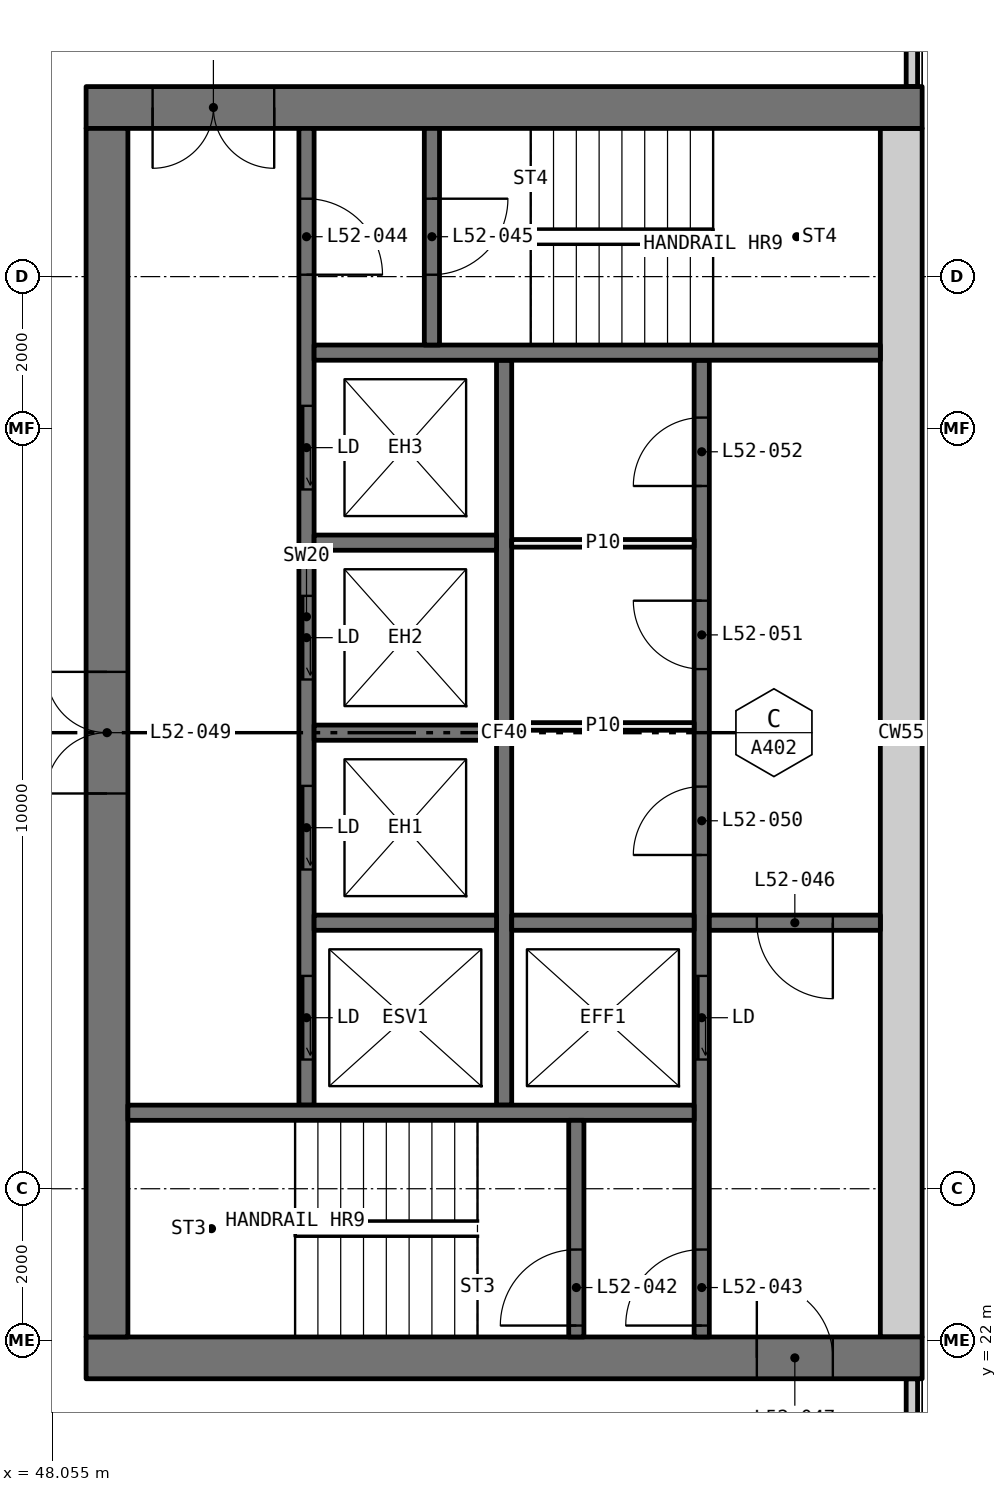
"""IFC4 building model, lengths in metres.
Left out: names, types, materials, properties, quantities, classifications, styles, units other than length and angle.
Written with IfcOpenShell. Run it as: python <this file> out.ifc"""

import sys

from ifc_helpers import new_model, si_unit, direction, frame, frame_2d, origin, place, context, subcontext, project, spatial, rectangle, extrude, element, fill, save


model = new_model("IFC4")
c1 = context("Model", 3, precision=1e-05, world=origin(), true_north=direction((0.0, 1.0)))
c2 = subcontext(c1, "Body", "Model", "MODEL_VIEW")
j1 = project(units=[si_unit("LENGTHUNIT", "METRE"), si_unit("PLANEANGLEUNIT", "RADIAN")], contexts=[c1])
p1 = place(None, origin())
s1 = spatial("IfcSite", under=j1, at=p1, CompositionType="ELEMENT")
p2 = place(p1, origin())
s2 = spatial("IfcBuilding", under=s1, at=p2, CompositionType="ELEMENT")
p3 = place(p2, frame((0.0, 0.0, 196.2)))
s3 = spatial("IfcBuildingStorey", under=s2, at=p3, CompositionType="ELEMENT", Elevation=196.2)
for number, where, z_axis, x_axis in (
    (1, (59.365, 18.71, 0.0), (0.0, 0.0, 1.0), (0.0, 1.0, 0.0)),
    (2, (59.365, 38.5, 0.0), (0.0, 0.0, 1.0), (0.0, 1.0, 0.0)),
):
    element("IfcWall", number, at=place(p3, frame(where, z_axis=z_axis, x_axis=x_axis)), inside=s3, PredefinedType="ELEMENTEDWALL", context=c2, shape_type="SweptSolid", body=[
        extrude(rectangle(XDim=2.79, YDim=0.15, at=frame_2d((1.395, 0.0))), origin(), (0.0, 0.0, 1.0), 3.05),
    ])
p4 = place(p3, frame((59.5, 21.775, 0.0), z_axis=(0.0, 0.0, 1.0), x_axis=(-1.0, 0.0, 0.0)))
e3 = element("IfcWall", 3, at=p4, inside=s3, PredefinedType="SHEAR", context=c2, shape_type="SweptSolid", body=[
    extrude(rectangle(XDim=11.0, YDim=0.55, at=frame_2d((5.5, 0.0))), origin(), (0.0, 0.0, 1.0), 3.05),
])
p5 = place(p4, frame((1.175, 0.0, 0.0)))
e4 = element("IfcOpeningElement", 4, at=p5, cuts=e3, PredefinedType="OPENING", context=c2, shape_type="SweptSolid", body=[
    extrude(rectangle(XDim=1.0, YDim=2.1, at=frame_2d((0.5, 1.05))), frame((0.0, 0.285, 0.0), z_axis=(0.0, -1.0, 0.0), x_axis=(1.0, 0.0, 0.0)), (0.0, 0.0, 1.0), 0.57),
])
p6 = place(p3, frame((59.5, 38.225, 0.0), z_axis=(0.0, 0.0, 1.0), x_axis=(-1.0, 0.0, 0.0)))
e5 = element("IfcWall", 5, at=p6, inside=s3, PredefinedType="SHEAR", context=c2, shape_type="SweptSolid", body=[
    extrude(rectangle(XDim=11.0, YDim=0.55, at=frame_2d((5.5, 0.0))), origin(), (0.0, 0.0, 1.0), 3.05),
])
p7 = place(p6, frame((8.525, 0.0, 0.0)))
e6 = element("IfcOpeningElement", 6, at=p7, cuts=e5, PredefinedType="OPENING", context=c2, shape_type="SweptSolid", body=[
    extrude(rectangle(XDim=1.6, YDim=2.1, at=frame_2d((0.8, 1.05))), frame((0.0, 0.285, 0.0), z_axis=(0.0, -1.0, 0.0), x_axis=(1.0, 0.0, 0.0)), (0.0, 0.0, 1.0), 0.57),
])
p8 = place(p3, frame((59.225, 22.05, 0.0), z_axis=(0.0, 0.0, 1.0), x_axis=(0.0, 1.0, 0.0)))
e7 = element("IfcWall", 7, at=p8, inside=s3, PredefinedType="SHEAR", context=c2, shape_type="SweptSolid", body=[
    extrude(rectangle(XDim=15.9, YDim=0.55, at=frame_2d((7.95, 0.0))), origin(), (0.0, 0.0, 1.0), 3.05),
])
p9 = place(p3, frame((48.775, 22.05, 0.0), z_axis=(0.0, 0.0, 1.0), x_axis=(0.0, 1.0, 0.0)))
e8 = element("IfcWall", 8, at=p9, inside=s3, PredefinedType="SHEAR", context=c2, shape_type="SweptSolid", body=[
    extrude(rectangle(XDim=15.9, YDim=0.55, at=frame_2d((7.95, 0.0))), origin(), (0.0, 0.0, 1.0), 3.05),
])
p10 = place(p9, frame((7.15, 0.0, 0.0)))
e9 = element("IfcOpeningElement", 9, at=p10, cuts=e8, PredefinedType="OPENING", context=c2, shape_type="SweptSolid", body=[
    extrude(rectangle(XDim=1.6, YDim=2.1, at=frame_2d((0.8, 1.05))), frame((0.0, 0.285, 0.0), z_axis=(0.0, -1.0, 0.0), x_axis=(1.0, 0.0, 0.0)), (0.0, 0.0, 1.0), 0.57),
])
p11 = place(p3, frame((56.6, 22.05, 0.0), z_axis=(0.0, 0.0, 1.0), x_axis=(0.0, 1.0, 0.0)))
e10 = element("IfcWall", 10, at=p11, inside=s3, PredefinedType="SOLIDWALL", context=c2, shape_type="SweptSolid", body=[
    extrude(rectangle(XDim=12.85, YDim=0.2, at=frame_2d((6.425, 0.0))), origin(), (0.0, 0.0, 1.0), 3.05),
])
p12 = place(p11, frame((3.65, 0.0, 0.0)))
e11 = element("IfcOpeningElement", 11, at=p12, cuts=e10, PredefinedType="OPENING", context=c2, shape_type="SweptSolid", body=[
    extrude(rectangle(XDim=1.1, YDim=2.1, at=frame_2d((0.55, 1.05))), frame((0.0, 0.11, 0.0), z_axis=(0.0, -1.0, 0.0), x_axis=(1.0, 0.0, 0.0)), (0.0, 0.0, 1.0), 0.22),
])
p13 = place(p11, frame((0.15, 0.0, 0.0)))
e12 = element("IfcOpeningElement", 12, at=p13, cuts=e10, PredefinedType="OPENING", context=c2, shape_type="SweptSolid", body=[
    extrude(rectangle(XDim=1.0, YDim=2.1, at=frame_2d((0.5, 1.05))), frame((0.0, 0.11, 0.0), z_axis=(0.0, -1.0, 0.0), x_axis=(1.0, 0.0, 0.0)), (0.0, 0.0, 1.0), 0.22),
])
p14 = place(p11, frame((6.341, 0.0, 0.0)))
e13 = element("IfcOpeningElement", 13, at=p14, cuts=e10, PredefinedType="OPENING", context=c2, shape_type="SweptSolid", body=[
    extrude(rectangle(XDim=0.9, YDim=2.1, at=frame_2d((0.45, 1.05))), frame((0.0, 0.11, 0.0), z_axis=(0.0, -1.0, 0.0), x_axis=(1.0, 0.0, 0.0)), (0.0, 0.0, 1.0), 0.22),
])
p15 = place(p11, frame((8.787, 0.0, 0.0)))
e14 = element("IfcOpeningElement", 14, at=p15, cuts=e10, PredefinedType="OPENING", context=c2, shape_type="SweptSolid", body=[
    extrude(rectangle(XDim=0.9, YDim=2.1, at=frame_2d((0.45, 1.05))), frame((0.0, 0.11, 0.0), z_axis=(0.0, -1.0, 0.0), x_axis=(1.0, 0.0, 0.0)), (0.0, 0.0, 1.0), 0.22),
])
p16 = place(p11, frame((11.196, 0.0, 0.0)))
e15 = element("IfcOpeningElement", 15, at=p16, cuts=e10, PredefinedType="OPENING", context=c2, shape_type="SweptSolid", body=[
    extrude(rectangle(XDim=0.9, YDim=2.1, at=frame_2d((0.45, 1.05))), frame((0.0, 0.11, 0.0), z_axis=(0.0, -1.0, 0.0), x_axis=(1.0, 0.0, 0.0)), (0.0, 0.0, 1.0), 0.22),
])
p17 = place(p3, frame((51.4, 25.1, 0.0), z_axis=(0.0, 0.0, 1.0), x_axis=(0.0, 1.0, 0.0)))
e16 = element("IfcWall", 16, at=p17, inside=s3, PredefinedType="SOLIDWALL", context=c2, shape_type="SweptSolid", body=[
    extrude(rectangle(XDim=12.85, YDim=0.2, at=frame_2d((6.425, 0.0))), origin(), (0.0, 0.0, 1.0), 3.05),
])
p18 = place(p17, frame((0.6, 0.0, 0.0)))
e17 = element("IfcOpeningElement", 17, at=p18, cuts=e16, PredefinedType="OPENING", context=c2, shape_type="SweptSolid", body=[
    extrude(rectangle(XDim=1.1, YDim=2.1, at=frame_2d((0.55, 1.05))), frame((0.0, 0.11, 0.0), z_axis=(0.0, -1.0, 0.0), x_axis=(1.0, 0.0, 0.0)), (0.0, 0.0, 1.0), 0.22),
])
p19 = place(p17, frame((3.1, 0.0, 0.0)))
e18 = element("IfcOpeningElement", 18, at=p19, cuts=e16, PredefinedType="OPENING", context=c2, shape_type="SweptSolid", body=[
    extrude(rectangle(XDim=1.1, YDim=2.1, at=frame_2d((0.55, 1.05))), frame((0.0, 0.11, 0.0), z_axis=(0.0, -1.0, 0.0), x_axis=(1.0, 0.0, 0.0)), (0.0, 0.0, 1.0), 0.22),
])
p20 = place(p17, frame((5.6, 0.0, 0.0)))
e19 = element("IfcOpeningElement", 19, at=p20, cuts=e16, PredefinedType="OPENING", context=c2, shape_type="SweptSolid", body=[
    extrude(rectangle(XDim=1.1, YDim=2.1, at=frame_2d((0.55, 1.05))), frame((0.0, 0.11, 0.0), z_axis=(0.0, -1.0, 0.0), x_axis=(1.0, 0.0, 0.0)), (0.0, 0.0, 1.0), 0.22),
])
p21 = place(p17, frame((8.1, 0.0, 0.0)))
e20 = element("IfcOpeningElement", 20, at=p21, cuts=e16, PredefinedType="OPENING", context=c2, shape_type="SweptSolid", body=[
    extrude(rectangle(XDim=1.1, YDim=2.1, at=frame_2d((0.55, 1.05))), frame((0.0, 0.11, 0.0), z_axis=(0.0, -1.0, 0.0), x_axis=(1.0, 0.0, 0.0)), (0.0, 0.0, 1.0), 0.22),
])
p22 = place(p17, frame((10.925, 0.0, 0.0)))
e21 = element("IfcOpeningElement", 21, at=p22, cuts=e16, PredefinedType="OPENING", context=c2, shape_type="SweptSolid", body=[
    extrude(rectangle(XDim=1.0, YDim=2.1, at=frame_2d((0.5, 1.05))), frame((0.0, 0.11, 0.0), z_axis=(0.0, -1.0, 0.0), x_axis=(1.0, 0.0, 0.0)), (0.0, 0.0, 1.0), 0.22),
])
p23 = place(p3, frame((54.0, 25.1, 0.0), z_axis=(0.0, 0.0, 1.0), x_axis=(0.0, 1.0, 0.0)))
e22 = element("IfcWall", 22, at=p23, inside=s3, PredefinedType="SOLIDWALL", context=c2, shape_type="SweptSolid", body=[
    extrude(rectangle(XDim=9.8, YDim=0.2, at=frame_2d((4.9, 0.0))), origin(), (0.0, 0.0, 1.0), 3.05),
])
for number, where, z_axis, x_axis in (
    (23, (56.5, 25.0, 0.0), (0.0, 0.0, 1.0), (-1.0, 0.0, 0.0)),
    (24, (58.95, 35.0, 0.0), (0.0, 0.0, 1.0), (-1.0, 0.0, 0.0)),
):
    element("IfcWall", number, at=place(p3, frame(where, z_axis=z_axis, x_axis=x_axis)), inside=s3, PredefinedType="SOLIDWALL", context=c2, shape_type="SweptSolid", body=[
        extrude(rectangle(XDim=7.45, YDim=0.2, at=frame_2d((3.725, 0.0))), origin(), (0.0, 0.0, 1.0), 3.05),
    ])
p24 = place(p3, frame((58.95, 27.5, 0.0), z_axis=(0.0, 0.0, 1.0), x_axis=(-1.0, 0.0, 0.0)))
e25 = element("IfcWall", 25, at=p24, inside=s3, PredefinedType="SOLIDWALL", context=c2, shape_type="SweptSolid", body=[
    extrude(rectangle(XDim=2.25, YDim=0.2, at=frame_2d((1.125, 0.0))), origin(), (0.0, 0.0, 1.0), 3.05),
])
p25 = place(p24, frame((0.625, 0.0, 0.0)))
e26 = element("IfcOpeningElement", 26, at=p25, cuts=e25, PredefinedType="OPENING", context=c2, shape_type="SweptSolid", body=[
    extrude(rectangle(XDim=1.0, YDim=2.1, at=frame_2d((0.5, 1.05))), frame((0.0, 0.11, 0.0), z_axis=(0.0, -1.0, 0.0), x_axis=(1.0, 0.0, 0.0)), (0.0, 0.0, 1.0), 0.22),
])
p26 = place(p3, frame((54.95, 22.05, 0.0), z_axis=(0.0, 0.0, 1.0), x_axis=(0.0, 1.0, 0.0)))
e27 = element("IfcWall", 27, at=p26, inside=s3, PredefinedType="SOLIDWALL", context=c2, shape_type="SweptSolid", body=[
    extrude(rectangle(XDim=2.85, YDim=0.2, at=frame_2d((1.425, 0.0))), origin(), (0.0, 0.0, 1.0), 3.05),
])
p27 = place(p26, frame((0.15, 0.0, 0.0)))
e28 = element("IfcOpeningElement", 28, at=p27, cuts=e27, PredefinedType="OPENING", context=c2, shape_type="SweptSolid", body=[
    extrude(rectangle(XDim=1.0, YDim=2.1, at=frame_2d((0.5, 1.05))), frame((0.0, 0.11, 0.0), z_axis=(0.0, -1.0, 0.0), x_axis=(1.0, 0.0, 0.0)), (0.0, 0.0, 1.0), 0.22),
])
p28 = place(p3, frame((53.05, 35.1, 0.0), z_axis=(0.0, 0.0, 1.0), x_axis=(0.0, 1.0, 0.0)))
e29 = element("IfcWall", 29, at=p28, inside=s3, PredefinedType="SOLIDWALL", context=c2, shape_type="SweptSolid", body=[
    extrude(rectangle(XDim=2.85, YDim=0.2, at=frame_2d((1.425, 0.0))), origin(), (0.0, 0.0, 1.0), 3.05),
])
p29 = place(p28, frame((0.925, 0.0, 0.0)))
e30 = element("IfcOpeningElement", 30, at=p29, cuts=e29, PredefinedType="OPENING", context=c2, shape_type="SweptSolid", body=[
    extrude(rectangle(XDim=1.0, YDim=2.1, at=frame_2d((0.5, 1.05))), frame((0.0, 0.11, 0.0), z_axis=(0.0, -1.0, 0.0), x_axis=(1.0, 0.0, 0.0)), (0.0, 0.0, 1.0), 0.22),
])
for number, where, z_axis, x_axis in (
    (31, (56.5, 27.5, 0.0), (0.0, 0.0, 1.0), (-1.0, 0.0, 0.0)),
    (32, (53.9, 27.5, 0.0), (0.0, 0.0, 1.0), (-1.0, 0.0, 0.0)),
    (33, (53.9, 30.0, 0.0), (0.0, 0.0, 1.0), (-1.0, 0.0, 0.0)),
    (34, (53.9, 32.5, 0.0), (0.0, 0.0, 1.0), (-1.0, 0.0, 0.0)),
):
    element("IfcWall", number, at=place(p3, frame(where, z_axis=z_axis, x_axis=x_axis)), inside=s3, PredefinedType="SOLIDWALL", context=c2, shape_type="SweptSolid", body=[
        extrude(rectangle(XDim=2.4, YDim=0.2, at=frame_2d((1.2, 0.0))), origin(), (0.0, 0.0, 1.0), 3.05),
    ])
for number, where, z_axis, x_axis in (
    (35, (56.5, 30.082, 0.0), (0.0, 0.0, 1.0), (-1.0, 0.0, 0.0)),
    (36, (56.5, 32.491, 0.0), (0.0, 0.0, 1.0), (-1.0, 0.0, 0.0)),
):
    element("IfcWall", number, at=place(p3, frame(where, z_axis=z_axis, x_axis=x_axis)), inside=s3, PredefinedType="PARTITIONING", context=c2, shape_type="SweptSolid", body=[
        extrude(rectangle(XDim=2.4, YDim=0.1, at=frame_2d((1.2, 0.0))), origin(), (0.0, 0.0, 1.0), 3.05),
    ])
p30 = place(p18, origin())
e37 = element("IfcDoor", 37, at=p30, inside=s3, OperationType="SLIDING_TO_LEFT", PredefinedType="DOOR", context=c2, shape_type="SweptSolid", body=[
    extrude(rectangle(XDim=1.1, YDim=2.1, at=frame_2d((0.55, 1.05))), frame((0.0, 0.025, 0.0), z_axis=(0.0, -1.0, 0.0), x_axis=(1.0, 0.0, 0.0)), (0.0, 0.0, 1.0), 0.05),
])
fill(e17, e37)
p31 = place(p19, origin())
e38 = element("IfcDoor", 38, at=p31, inside=s3, OperationType="SLIDING_TO_LEFT", PredefinedType="DOOR", context=c2, shape_type="SweptSolid", body=[
    extrude(rectangle(XDim=1.1, YDim=2.1, at=frame_2d((0.55, 1.05))), frame((0.0, 0.025, 0.0), z_axis=(0.0, -1.0, 0.0), x_axis=(1.0, 0.0, 0.0)), (0.0, 0.0, 1.0), 0.05),
])
fill(e18, e38)
p32 = place(p20, origin())
e39 = element("IfcDoor", 39, at=p32, inside=s3, OperationType="SLIDING_TO_LEFT", PredefinedType="DOOR", context=c2, shape_type="SweptSolid", body=[
    extrude(rectangle(XDim=1.1, YDim=2.1, at=frame_2d((0.55, 1.05))), frame((0.0, 0.025, 0.0), z_axis=(0.0, -1.0, 0.0), x_axis=(1.0, 0.0, 0.0)), (0.0, 0.0, 1.0), 0.05),
])
fill(e19, e39)
p33 = place(p21, origin())
e40 = element("IfcDoor", 40, at=p33, inside=s3, OperationType="SLIDING_TO_LEFT", PredefinedType="DOOR", context=c2, shape_type="SweptSolid", body=[
    extrude(rectangle(XDim=1.1, YDim=2.1, at=frame_2d((0.55, 1.05))), frame((0.0, 0.025, 0.0), z_axis=(0.0, -1.0, 0.0), x_axis=(1.0, 0.0, 0.0)), (0.0, 0.0, 1.0), 0.05),
])
fill(e20, e40)
p34 = place(p12, origin())
e41 = element("IfcDoor", 41, at=p34, inside=s3, OperationType="SLIDING_TO_LEFT", PredefinedType="DOOR", context=c2, shape_type="SweptSolid", body=[
    extrude(rectangle(XDim=1.1, YDim=2.1, at=frame_2d((0.55, 1.05))), frame((0.0, 0.025, 0.0), z_axis=(0.0, -1.0, 0.0), x_axis=(1.0, 0.0, 0.0)), (0.0, 0.0, 1.0), 0.05),
])
fill(e11, e41)
p35 = place(p27, origin())
e42 = element("IfcDoor", 42, at=p35, inside=s3, OperationType="SINGLE_SWING_RIGHT", PredefinedType="DOOR", context=c2, shape_type="SweptSolid", body=[
    extrude(rectangle(XDim=1.0, YDim=2.1, at=frame_2d((0.5, 1.05))), frame((0.0, 0.025, 0.0), z_axis=(0.0, -1.0, 0.0), x_axis=(1.0, 0.0, 0.0)), (0.0, 0.0, 1.0), 0.05),
])
fill(e28, e42)
p36 = place(p13, origin())
e43 = element("IfcDoor", 43, at=p36, inside=s3, OperationType="SINGLE_SWING_RIGHT", PredefinedType="DOOR", context=c2, shape_type="SweptSolid", body=[
    extrude(rectangle(XDim=1.0, YDim=2.1, at=frame_2d((0.5, 1.05))), frame((0.0, 0.025, 0.0), z_axis=(0.0, -1.0, 0.0), x_axis=(1.0, 0.0, 0.0)), (0.0, 0.0, 1.0), 0.05),
])
fill(e12, e43)
p37 = place(p22, frame((1.0, 0.0, 0.0), x_axis=(-1.0, 0.0, 0.0)))
e44 = element("IfcDoor", 44, at=p37, inside=s3, OperationType="SINGLE_SWING_LEFT", PredefinedType="DOOR", context=c2, shape_type="SweptSolid", body=[
    extrude(rectangle(XDim=1.0, YDim=2.1, at=frame_2d((0.5, 1.05))), frame((0.0, 0.025, 0.0), z_axis=(0.0, -1.0, 0.0), x_axis=(1.0, 0.0, 0.0)), (0.0, 0.0, 1.0), 0.05),
])
fill(e21, e44)
p38 = place(p29, frame((1.0, 0.0, 0.0), x_axis=(-1.0, 0.0, 0.0)))
e45 = element("IfcDoor", 45, at=p38, inside=s3, OperationType="SINGLE_SWING_RIGHT", PredefinedType="DOOR", context=c2, shape_type="SweptSolid", body=[
    extrude(rectangle(XDim=1.0, YDim=2.1, at=frame_2d((0.5, 1.05))), frame((0.0, 0.025, 0.0), z_axis=(0.0, -1.0, 0.0), x_axis=(1.0, 0.0, 0.0)), (0.0, 0.0, 1.0), 0.05),
])
fill(e30, e45)
p39 = place(p25, origin())
e46 = element("IfcDoor", 46, at=p39, inside=s3, OperationType="SINGLE_SWING_RIGHT", PredefinedType="DOOR", context=c2, shape_type="SweptSolid", body=[
    extrude(rectangle(XDim=1.0, YDim=2.1, at=frame_2d((0.5, 1.05))), frame((0.0, 0.025, 0.0), z_axis=(0.0, -1.0, 0.0), x_axis=(1.0, 0.0, 0.0)), (0.0, 0.0, 1.0), 0.05),
])
fill(e26, e46)
p40 = place(p5, frame((1.0, 0.0, 0.0), x_axis=(-1.0, 0.0, 0.0)))
e47 = element("IfcDoor", 47, at=p40, inside=s3, OperationType="SINGLE_SWING_RIGHT", PredefinedType="DOOR", context=c2, shape_type="SweptSolid", body=[
    extrude(rectangle(XDim=1.0, YDim=2.1, at=frame_2d((0.5, 1.05))), frame((0.0, 0.025, 0.0), z_axis=(0.0, -1.0, 0.0), x_axis=(1.0, 0.0, 0.0)), (0.0, 0.0, 1.0), 0.05),
])
fill(e4, e47)
p41 = place(p7, origin())
e48 = element("IfcDoor", 48, at=p41, inside=s3, OperationType="DOUBLE_DOOR_SINGLE_SWING", PredefinedType="DOOR", context=c2, shape_type="SweptSolid", body=[
    extrude(rectangle(XDim=1.6, YDim=2.1, at=frame_2d((0.8, 1.05))), frame((0.0, 0.025, 0.0), z_axis=(0.0, -1.0, 0.0), x_axis=(1.0, 0.0, 0.0)), (0.0, 0.0, 1.0), 0.05),
])
fill(e6, e48)
p42 = place(p10, origin())
e49 = element("IfcDoor", 49, at=p42, inside=s3, OperationType="DOUBLE_DOOR_SINGLE_SWING", PredefinedType="DOOR", context=c2, shape_type="SweptSolid", body=[
    extrude(rectangle(XDim=1.6, YDim=2.1, at=frame_2d((0.8, 1.05))), frame((0.0, 0.025, 0.0), z_axis=(0.0, -1.0, 0.0), x_axis=(1.0, 0.0, 0.0)), (0.0, 0.0, 1.0), 0.05),
])
fill(e9, e49)
p43 = place(p14, origin())
e50 = element("IfcDoor", 50, at=p43, inside=s3, OperationType="SINGLE_SWING_RIGHT", PredefinedType="DOOR", context=c2, shape_type="SweptSolid", body=[
    extrude(rectangle(XDim=0.9, YDim=2.1, at=frame_2d((0.45, 1.05))), frame((0.0, 0.025, 0.0), z_axis=(0.0, -1.0, 0.0), x_axis=(1.0, 0.0, 0.0)), (0.0, 0.0, 1.0), 0.05),
])
fill(e13, e50)
p44 = place(p15, origin())
e51 = element("IfcDoor", 51, at=p44, inside=s3, OperationType="SINGLE_SWING_LEFT", PredefinedType="DOOR", context=c2, shape_type="SweptSolid", body=[
    extrude(rectangle(XDim=0.9, YDim=2.1, at=frame_2d((0.45, 1.05))), frame((0.0, 0.025, 0.0), z_axis=(0.0, -1.0, 0.0), x_axis=(1.0, 0.0, 0.0)), (0.0, 0.0, 1.0), 0.05),
])
fill(e14, e51)
p45 = place(p16, origin())
e52 = element("IfcDoor", 52, at=p45, inside=s3, OperationType="SINGLE_SWING_RIGHT", PredefinedType="DOOR", context=c2, shape_type="SweptSolid", body=[
    extrude(rectangle(XDim=0.9, YDim=2.1, at=frame_2d((0.45, 1.05))), frame((0.0, 0.025, 0.0), z_axis=(0.0, -1.0, 0.0), x_axis=(1.0, 0.0, 0.0)), (0.0, 0.0, 1.0), 0.05),
])
fill(e15, e52)
save(model, sys.argv[1])
